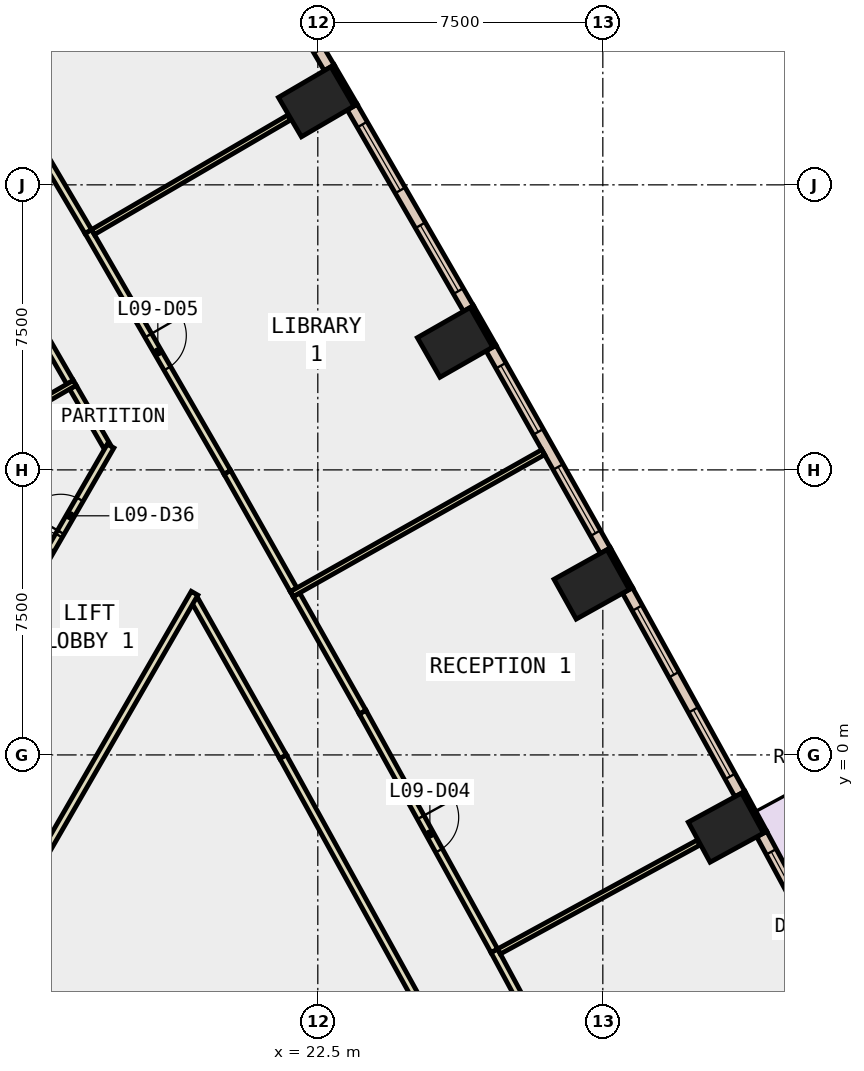
"""IFC4 building model, lengths in metres.
Left out: names, types, materials, properties, quantities, classifications, styles, units other than length and angle.
Written with IfcOpenShell. Run it as: python <this file> out.ifc"""

import sys

from ifc_helpers import new_model, si_unit, direction, frame, frame_2d, origin, origin_2d, place, context, subcontext, project, spatial, rectangle, extrude, element, fill, save


model = new_model("IFC4")
c1 = context("Model", 3, precision=1e-05, world=origin(), true_north=direction((0.0, 1.0)))
c2 = subcontext(c1, "Body", "Model", "MODEL_VIEW")
j1 = project(units=[si_unit("LENGTHUNIT", "METRE"), si_unit("PLANEANGLEUNIT", "RADIAN")], contexts=[c1])
p1 = place(None, origin())
s1 = spatial("IfcSite", under=j1, at=p1, CompositionType="ELEMENT")
p2 = place(p1, origin())
s2 = spatial("IfcBuilding", under=s1, at=p2, CompositionType="ELEMENT")
p3 = place(p2, frame((0.0, 0.0, 47.6)))
s3 = spatial("IfcBuildingStorey", under=s2, at=p3, CompositionType="ELEMENT", Elevation=47.6)
for number, where, z_axis, x_axis in (
    (1, (33.238, -1.913, -0.4), (0.0, 0.0, 1.0), (-0.478, 0.878, 0.0)),
    (2, (29.706, 4.487, -0.4), (0.0, 0.0, 1.0), (-0.487, 0.873, 0.0)),
    (3, (26.112, 10.855, -0.4), (0.0, 0.0, 1.0), (-0.496, 0.869, 0.0)),
    (4, (22.457, 17.186, -0.4), (0.0, 0.0, 1.0), (-0.504, 0.864, 0.0)),
):
    element("IfcColumn", number, at=place(p3, frame(where, z_axis=z_axis, x_axis=x_axis)), inside=s3, PredefinedType="COLUMN", context=c2, shape_type="SweptSolid", body=[
        extrude(rectangle(XDim=1.2, YDim=1.6, at=origin_2d()), origin(), (0.0, 0.0, 1.0), 4.2),
    ])
p4 = place(p3, frame((9.31, -5.375, -0.4), z_axis=(0.0, 0.0, 1.0), x_axis=(0.866017533419, -0.500013631625, 0.0)))
e5 = element("IfcWall", 5, at=p4, inside=s3, PredefinedType="SHEAR", context=c2, shape_type="SweptSolid", body=[
    extrude(rectangle(XDim=9.0, YDim=0.8, at=frame_2d((4.5, 0.0))), origin(), (0.0, 0.0, 1.0), 4.2),
])
p5 = place(p3, frame((34.271, -2.034, 0.0), z_axis=(0.0, 0.0, 1.0), x_axis=(-0.478267644701, 0.878214131082, 0.0)))
e6 = element("IfcWall", 6, at=p5, inside=s3, PredefinedType="STANDARD", context=c2, shape_type="SweptSolid", body=[
    extrude(rectangle(XDim=1.2, YDim=0.1, at=frame_2d((0.6, 0.0))), origin(), (0.0, 0.0, 1.0), 3.8),
])
p6 = place(p3, frame((30.74, 4.377, 0.0), z_axis=(0.0, 0.0, 1.0), x_axis=(-0.486730996044, 0.87355190887, 0.0)))
e7 = element("IfcWall", 7, at=p6, inside=s3, PredefinedType="STANDARD", context=c2, shape_type="SweptSolid", body=[
    extrude(rectangle(XDim=1.2, YDim=0.1, at=frame_2d((0.6, 0.0))), origin(), (0.0, 0.0, 1.0), 3.8),
])
p7 = place(p3, frame((27.148, 10.755, 0.0), z_axis=(0.0, 0.0, 1.0), x_axis=(-0.495766453659, 0.86845588456, 0.0)))
e8 = element("IfcWall", 8, at=p7, inside=s3, PredefinedType="STANDARD", context=c2, shape_type="SweptSolid", body=[
    extrude(rectangle(XDim=1.2, YDim=0.1, at=frame_2d((0.6, 0.0))), origin(), (0.0, 0.0, 1.0), 3.8),
])
p8 = place(p3, frame((23.493, 17.097, 0.0), z_axis=(0.0, 0.0, 1.0), x_axis=(-0.504225229382, 0.863572184623, 0.0)))
e9 = element("IfcWall", 9, at=p8, inside=s3, PredefinedType="STANDARD", context=c2, shape_type="SweptSolid", body=[
    extrude(rectangle(XDim=1.2, YDim=0.1, at=frame_2d((0.6, 0.0))), origin(), (0.0, 0.0, 1.0), 3.8),
])
p9 = place(p3, frame((37.086, -7.47, 0.0), z_axis=(0.0, 0.0, 1.0), x_axis=(-0.474584950749, 0.880209704856, 0.0)))
e10 = element("IfcWall", 10, at=p9, inside=s3, PredefinedType="STANDARD", context=c2, shape_type="SweptSolid", body=[
    extrude(rectangle(XDim=6.121, YDim=0.3, at=frame_2d((3.061, 0.0))), origin(), (0.0, 0.0, 1.0), 3.8),
])
p10 = place(p9, frame((0.53, 0.0, 0.0)))
e11 = element("IfcOpeningElement", 11, at=p10, cuts=e10, PredefinedType="OPENING", context=c2, shape_type="SweptSolid", body=[
    extrude(rectangle(XDim=2.0, YDim=2.4, at=frame_2d((1.0, 1.2))), frame((0.0, 0.16, 0.0), z_axis=(0.0, -1.0, 0.0), x_axis=(1.0, 0.0, 0.0)), (0.0, 0.0, 1.0), 0.32),
])
p11 = place(p9, frame((3.591, 0.0, 0.9)))
e12 = element("IfcOpeningElement", 12, at=p11, cuts=e10, PredefinedType="OPENING", context=c2, shape_type="SweptSolid", body=[
    extrude(rectangle(XDim=2.0, YDim=2.6, at=frame_2d((1.0, 1.3))), frame((0.0, 0.16, 0.0), z_axis=(0.0, -1.0, 0.0), x_axis=(1.0, 0.0, 0.0)), (0.0, 0.0, 1.0), 0.32),
])
p12 = place(p3, frame((33.607, -1.03, 0.0), z_axis=(0.0, 0.0, 1.0), x_axis=(-0.483195456594, 0.875512507465, 0.0)))
e13 = element("IfcWall", 13, at=p12, inside=s3, PredefinedType="STANDARD", context=c2, shape_type="SweptSolid", body=[
    extrude(rectangle(XDim=6.12, YDim=0.3, at=frame_2d((3.06, 0.0))), origin(), (0.0, 0.0, 1.0), 3.8),
])
p13 = place(p12, frame((0.53, 0.0, 0.9)))
e14 = element("IfcOpeningElement", 14, at=p13, cuts=e13, PredefinedType="OPENING", context=c2, shape_type="SweptSolid", body=[
    extrude(rectangle(XDim=2.0, YDim=2.6, at=frame_2d((1.0, 1.3))), frame((0.0, 0.16, 0.0), z_axis=(0.0, -1.0, 0.0), x_axis=(1.0, 0.0, 0.0)), (0.0, 0.0, 1.0), 0.32),
])
p14 = place(p12, frame((3.59, 0.0, 0.9)))
e15 = element("IfcOpeningElement", 15, at=p14, cuts=e13, PredefinedType="OPENING", context=c2, shape_type="SweptSolid", body=[
    extrude(rectangle(XDim=2.0, YDim=2.6, at=frame_2d((1.0, 1.3))), frame((0.0, 0.16, 0.0), z_axis=(0.0, -1.0, 0.0), x_axis=(1.0, 0.0, 0.0)), (0.0, 0.0, 1.0), 0.32),
])
p15 = place(p3, frame((30.067, 5.374, 0.0), z_axis=(0.0, 0.0, 1.0), x_axis=(-0.49151046248, 0.870871669807, 0.0)))
e16 = element("IfcWall", 16, at=p15, inside=s3, PredefinedType="STANDARD", context=c2, shape_type="SweptSolid", body=[
    extrude(rectangle(XDim=6.122, YDim=0.3, at=frame_2d((3.061, 0.0))), origin(), (0.0, 0.0, 1.0), 3.8),
])
p16 = place(p15, frame((0.53, 0.0, 0.9)))
e17 = element("IfcOpeningElement", 17, at=p16, cuts=e16, PredefinedType="OPENING", context=c2, shape_type="SweptSolid", body=[
    extrude(rectangle(XDim=2.0, YDim=2.6, at=frame_2d((1.0, 1.3))), frame((0.0, 0.16, 0.0), z_axis=(0.0, -1.0, 0.0), x_axis=(1.0, 0.0, 0.0)), (0.0, 0.0, 1.0), 0.32),
])
p17 = place(p15, frame((3.591, 0.0, 0.9)))
e18 = element("IfcOpeningElement", 18, at=p17, cuts=e16, PredefinedType="OPENING", context=c2, shape_type="SweptSolid", body=[
    extrude(rectangle(XDim=2.0, YDim=2.6, at=frame_2d((1.0, 1.3))), frame((0.0, 0.16, 0.0), z_axis=(0.0, -1.0, 0.0), x_axis=(1.0, 0.0, 0.0)), (0.0, 0.0, 1.0), 0.32),
])
p18 = place(p3, frame((26.464, 11.745, 0.0), z_axis=(0.0, 0.0, 1.0), x_axis=(-0.499957248001, 0.866050085256, 0.0)))
e19 = element("IfcWall", 19, at=p18, inside=s3, PredefinedType="STANDARD", context=c2, shape_type="SweptSolid", body=[
    extrude(rectangle(XDim=6.121, YDim=0.3, at=frame_2d((3.06, 0.0))), origin(), (0.0, 0.0, 1.0), 3.8),
])
p19 = place(p18, frame((0.53, 0.0, 0.9)))
e20 = element("IfcOpeningElement", 20, at=p19, cuts=e19, PredefinedType="OPENING", context=c2, shape_type="SweptSolid", body=[
    extrude(rectangle(XDim=2.0, YDim=2.6, at=frame_2d((1.0, 1.3))), frame((0.0, 0.16, 0.0), z_axis=(0.0, -1.0, 0.0), x_axis=(1.0, 0.0, 0.0)), (0.0, 0.0, 1.0), 0.32),
])
p20 = place(p18, frame((3.591, 0.0, 0.9)))
e21 = element("IfcOpeningElement", 21, at=p20, cuts=e19, PredefinedType="OPENING", context=c2, shape_type="SweptSolid", body=[
    extrude(rectangle(XDim=2.0, YDim=2.6, at=frame_2d((1.0, 1.3))), frame((0.0, 0.16, 0.0), z_axis=(0.0, -1.0, 0.0), x_axis=(1.0, 0.0, 0.0)), (0.0, 0.0, 1.0), 0.32),
])
p21 = place(p3, frame((22.8, 18.08, 0.0), z_axis=(0.0, 0.0, 1.0), x_axis=(-0.508412153373, 0.861113861404, 0.0)))
e22 = element("IfcWall", 22, at=p21, inside=s3, PredefinedType="STANDARD", context=c2, shape_type="SweptSolid", body=[
    extrude(rectangle(XDim=6.121, YDim=0.3, at=frame_2d((3.061, 0.0))), origin(), (0.0, 0.0, 1.0), 3.8),
])
p22 = place(p21, frame((0.53, 0.0, 0.9)))
e23 = element("IfcOpeningElement", 23, at=p22, cuts=e22, PredefinedType="OPENING", context=c2, shape_type="SweptSolid", body=[
    extrude(rectangle(XDim=2.0, YDim=2.6, at=frame_2d((1.0, 1.3))), frame((0.0, 0.16, 0.0), z_axis=(0.0, -1.0, 0.0), x_axis=(1.0, 0.0, 0.0)), (0.0, 0.0, 1.0), 0.32),
])
p23 = place(p21, frame((3.591, 0.0, 0.9)))
e24 = element("IfcOpeningElement", 24, at=p23, cuts=e22, PredefinedType="OPENING", context=c2, shape_type="SweptSolid", body=[
    extrude(rectangle(XDim=2.0, YDim=2.6, at=frame_2d((1.0, 1.3))), frame((0.0, 0.16, 0.0), z_axis=(0.0, -1.0, 0.0), x_axis=(1.0, 0.0, 0.0)), (0.0, 0.0, 1.0), 0.32),
])
p24 = place(p3, frame((15.98, 9.805, 0.0), z_axis=(0.0, 0.0, 1.0), x_axis=(-0.500150684419, 0.865938388614, 0.0)))
e25 = element("IfcWall", 25, at=p24, inside=s3, PredefinedType="PARTITIONING", context=c2, shape_type="SweptSolid", body=[
    extrude(rectangle(XDim=3.109, YDim=0.2, at=frame_2d((1.554, 0.0))), origin(), (0.0, 0.0, 1.0), 3.8),
])
p25 = place(p3, frame((16.948, 8.128, 0.0), z_axis=(0.0, 0.0, 1.0), x_axis=(-0.499931460552, 0.866064971437, 0.0)))
e26 = element("IfcWall", 26, at=p25, inside=s3, PredefinedType="PARTITIONING", context=c2, shape_type="SweptSolid", body=[
    extrude(rectangle(XDim=1.786, YDim=0.2, at=frame_2d((0.893, 0.0))), origin(), (0.0, 0.0, 1.0), 3.8),
])
p26 = place(p3, frame((25.074, -6.368, 0.0), z_axis=(0.0, 0.0, 1.0), x_axis=(-0.483126495407, 0.875550563609, 0.0)))
e27 = element("IfcWall", 27, at=p26, inside=s3, PredefinedType="PARTITIONING", context=c2, shape_type="SweptSolid", body=[
    extrude(rectangle(XDim=7.222, YDim=0.2, at=frame_2d((3.611, 0.0))), origin(), (0.0, 0.0, 1.0), 3.8),
])
p27 = place(p3, frame((21.585, -0.045, 0.0), z_axis=(0.0, 0.0, 1.0), x_axis=(-0.491542684896, 0.870853483042, 0.0)))
e28 = element("IfcWall", 28, at=p27, inside=s3, PredefinedType="PARTITIONING", context=c2, shape_type="SweptSolid", body=[
    extrude(rectangle(XDim=4.738, YDim=0.2, at=frame_2d((2.369, 0.0))), origin(), (0.0, 0.0, 1.0), 3.8),
])
p28 = place(p3, frame((27.145, -5.152, 0.0), z_axis=(0.0, 0.0, 1.0), x_axis=(0.474591029089, -0.880206427554, 0.0)))
e29 = element("IfcWall", 29, at=p28, inside=s3, PredefinedType="PARTITIONING", context=c2, shape_type="SweptSolid", body=[
    extrude(rectangle(XDim=7.32, YDim=0.2, at=frame_2d((3.66, 0.0))), origin(), (0.0, 0.0, 1.0), 3.8),
])
p29 = place(p28, frame((3.235, 0.0, 0.0)))
e30 = element("IfcOpeningElement", 30, at=p29, cuts=e29, PredefinedType="OPENING", context=c2, shape_type="SweptSolid", body=[
    extrude(rectangle(XDim=1.0, YDim=2.1, at=frame_2d((0.5, 1.05))), frame((0.0, 0.11, 0.0), z_axis=(0.0, -1.0, 0.0), x_axis=(1.0, 0.0, 0.0)), (0.0, 0.0, 1.0), 0.22),
])
p30 = place(p3, frame((21.937, 4.214, 0.0), z_axis=(0.0, 0.0, 1.0), x_axis=(0.491485799319, -0.870885588965, 0.0)))
e31 = element("IfcWall", 31, at=p30, inside=s3, PredefinedType="PARTITIONING", context=c2, shape_type="SweptSolid", body=[
    extrude(rectangle(XDim=3.548, YDim=0.2, at=frame_2d((1.774, 0.0))), origin(), (0.0, 0.0, 1.0), 3.8),
])
p31 = place(p3, frame((23.681, 1.124, 0.0), z_axis=(0.0, 0.0, 1.0), x_axis=(0.483125061868, -0.875551354631, 0.0)))
e32 = element("IfcWall", 32, at=p31, inside=s3, PredefinedType="PARTITIONING", context=c2, shape_type="SweptSolid", body=[
    extrude(rectangle(XDim=7.168, YDim=0.2, at=frame_2d((3.584, 0.0))), origin(), (0.0, 0.0, 1.0), 3.8),
])
p32 = place(p31, frame((3.159, 0.0, 0.0)))
e33 = element("IfcOpeningElement", 33, at=p32, cuts=e32, PredefinedType="OPENING", context=c2, shape_type="SweptSolid", body=[
    extrude(rectangle(XDim=1.0, YDim=2.1, at=frame_2d((0.5, 1.05))), frame((0.0, 0.11, 0.0), z_axis=(0.0, -1.0, 0.0), x_axis=(1.0, 0.0, 0.0)), (0.0, 0.0, 1.0), 0.22),
])
p33 = place(p3, frame((16.46, 13.772, 0.0), z_axis=(0.0, 0.0, 1.0), x_axis=(0.500099745063, -0.865967808286, 0.0)))
e34 = element("IfcWall", 34, at=p33, inside=s3, PredefinedType="PARTITIONING", context=c2, shape_type="SweptSolid", body=[
    extrude(rectangle(XDim=7.319, YDim=0.2, at=frame_2d((3.659, 0.0))), origin(), (0.0, 0.0, 1.0), 3.8),
])
p34 = place(p33, frame((3.159, 0.0, 0.0)))
e35 = element("IfcOpeningElement", 35, at=p34, cuts=e34, PredefinedType="OPENING", context=c2, shape_type="SweptSolid", body=[
    extrude(rectangle(XDim=1.0, YDim=2.1, at=frame_2d((0.5, 1.05))), frame((0.0, 0.11, 0.0), z_axis=(0.0, -1.0, 0.0), x_axis=(1.0, 0.0, 0.0)), (0.0, 0.0, 1.0), 0.22),
])
p35 = place(p3, frame((20.12, 7.434, 0.0), z_axis=(0.0, 0.0, 1.0), x_axis=(0.491394823876, -0.87093692485, 0.0)))
e36 = element("IfcWall", 36, at=p35, inside=s3, PredefinedType="PARTITIONING", context=c2, shape_type="SweptSolid", body=[
    extrude(rectangle(XDim=3.547, YDim=0.2, at=frame_2d((1.773, 0.0))), origin(), (0.0, 0.0, 1.0), 3.8),
])
p36 = place(p3, frame((12.815, 19.946, 0.0), z_axis=(0.0, 0.0, 1.0), x_axis=(0.508287536166, -0.861187424768, 0.0)))
e37 = element("IfcWall", 37, at=p36, inside=s3, PredefinedType="PARTITIONING", context=c2, shape_type="SweptSolid", body=[
    extrude(rectangle(XDim=7.169, YDim=0.2, at=frame_2d((3.584, 0.0))), origin(), (0.0, 0.0, 1.0), 3.8),
])
p37 = place(p3, frame((16.104, 9.79, 0.0), z_axis=(0.0, 0.0, 1.0), x_axis=(-0.866023462144, -0.500003363005, 0.0)))
e38 = element("IfcWall", 38, at=p37, inside=s3, PredefinedType="PARTITIONING", context=c2, shape_type="SweptSolid", body=[
    extrude(rectangle(XDim=5.592, YDim=0.15, at=frame_2d((2.796, 0.0))), origin(), (0.0, 0.0, 1.0), 3.8),
])
p38 = place(p3, frame((13.827, 2.55, 0.0), z_axis=(0.0, 0.0, 1.0), x_axis=(0.500093193185, 0.865971591988, 0.0)))
e39 = element("IfcWall", 39, at=p38, inside=s3, PredefinedType="PARTITIONING", context=c2, shape_type="SweptSolid", body=[
    extrude(rectangle(XDim=6.441, YDim=0.2, at=frame_2d((3.221, 0.0))), origin(), (0.0, 0.0, 1.0), 3.8),
])
p39 = place(p38, frame((2.721, 0.0, 0.0)))
e40 = element("IfcOpeningElement", 40, at=p39, cuts=e39, PredefinedType="OPENING", context=c2, shape_type="SweptSolid", body=[
    extrude(rectangle(XDim=1.0, YDim=2.1, at=frame_2d((0.5, 1.05))), frame((0.0, 0.11, 0.0), z_axis=(0.0, -1.0, 0.0), x_axis=(1.0, 0.0, 0.0)), (0.0, 0.0, 1.0), 0.22),
])
p40 = place(p38, frame((3.821, 0.0, 0.0)))
e41 = element("IfcOpeningElement", 41, at=p40, cuts=e39, PredefinedType="OPENING", context=c2, shape_type="SweptSolid", body=[
    extrude(rectangle(XDim=1.0, YDim=2.1, at=frame_2d((0.5, 1.05))), frame((0.0, 0.11, 0.0), z_axis=(0.0, -1.0, 0.0), x_axis=(1.0, 0.0, 0.0)), (0.0, 0.0, 1.0), 0.22),
])
p41 = place(p3, frame((19.257, 4.255, 0.0), z_axis=(0.0, 0.0, 1.0), x_axis=(-0.499978317034, -0.866037922089, 0.0)))
e42 = element("IfcWall", 42, at=p41, inside=s3, PredefinedType="PARTITIONING", context=c2, shape_type="SweptSolid", body=[
    extrude(rectangle(XDim=12.913, YDim=0.2, at=frame_2d((6.456, 0.0))), origin(), (0.0, 0.0, 1.0), 3.8),
])
p42 = place(p3, frame((27.268, -5.171, 0.0), z_axis=(0.0, 0.0, 1.0), x_axis=(0.877837854343, 0.478957932895, 0.0)))
e43 = element("IfcWall", 43, at=p42, inside=s3, PredefinedType="PARTITIONING", context=c2, shape_type="SweptSolid", body=[
    extrude(rectangle(XDim=5.982, YDim=0.15, at=frame_2d((2.991, 0.0))), origin(), (0.0, 0.0, 1.0), 3.8),
])
p43 = place(p3, frame((21.813, 4.231, 0.0), z_axis=(0.0, 0.0, 1.0), x_axis=(0.870901264369, 0.491458022337, 0.0)))
e44 = element("IfcWall", 44, at=p43, inside=s3, PredefinedType="PARTITIONING", context=c2, shape_type="SweptSolid", body=[
    extrude(rectangle(XDim=7.6, YDim=0.15, at=frame_2d((3.8, 0.0))), origin(), (0.0, 0.0, 1.0), 3.8),
])
p44 = place(p3, frame((16.584, 13.757, 0.0), z_axis=(0.0, 0.0, 1.0), x_axis=(0.863565634474, 0.504236447469, 0.0)))
e45 = element("IfcWall", 45, at=p44, inside=s3, PredefinedType="PARTITIONING", context=c2, shape_type="SweptSolid", body=[
    extrude(rectangle(XDim=5.981, YDim=0.15, at=frame_2d((2.99, 0.0))), origin(), (0.0, 0.0, 1.0), 3.8),
])
p45 = place(p11, origin())
e46 = element("IfcWindow", 46, at=p45, inside=s3, PartitioningType="SINGLE_PANEL", PredefinedType="WINDOW", context=c2, shape_type="SweptSolid", body=[
    extrude(rectangle(XDim=2.0, YDim=2.6, at=frame_2d((1.0, 1.3))), frame((0.0, 0.03, 0.0), z_axis=(0.0, -1.0, 0.0), x_axis=(1.0, 0.0, 0.0)), (0.0, 0.0, 1.0), 0.06),
])
fill(e12, e46)
p46 = place(p13, origin())
e47 = element("IfcWindow", 47, at=p46, inside=s3, PartitioningType="SINGLE_PANEL", PredefinedType="WINDOW", context=c2, shape_type="SweptSolid", body=[
    extrude(rectangle(XDim=2.0, YDim=2.6, at=frame_2d((1.0, 1.3))), frame((0.0, 0.03, 0.0), z_axis=(0.0, -1.0, 0.0), x_axis=(1.0, 0.0, 0.0)), (0.0, 0.0, 1.0), 0.06),
])
fill(e14, e47)
p47 = place(p14, origin())
e48 = element("IfcWindow", 48, at=p47, inside=s3, PartitioningType="SINGLE_PANEL", PredefinedType="WINDOW", context=c2, shape_type="SweptSolid", body=[
    extrude(rectangle(XDim=2.0, YDim=2.6, at=frame_2d((1.0, 1.3))), frame((0.0, 0.03, 0.0), z_axis=(0.0, -1.0, 0.0), x_axis=(1.0, 0.0, 0.0)), (0.0, 0.0, 1.0), 0.06),
])
fill(e15, e48)
p48 = place(p16, origin())
e49 = element("IfcWindow", 49, at=p48, inside=s3, PartitioningType="SINGLE_PANEL", PredefinedType="WINDOW", context=c2, shape_type="SweptSolid", body=[
    extrude(rectangle(XDim=2.0, YDim=2.6, at=frame_2d((1.0, 1.3))), frame((0.0, 0.03, 0.0), z_axis=(0.0, -1.0, 0.0), x_axis=(1.0, 0.0, 0.0)), (0.0, 0.0, 1.0), 0.06),
])
fill(e17, e49)
p49 = place(p17, origin())
e50 = element("IfcWindow", 50, at=p49, inside=s3, PartitioningType="SINGLE_PANEL", PredefinedType="WINDOW", context=c2, shape_type="SweptSolid", body=[
    extrude(rectangle(XDim=2.0, YDim=2.6, at=frame_2d((1.0, 1.3))), frame((0.0, 0.03, 0.0), z_axis=(0.0, -1.0, 0.0), x_axis=(1.0, 0.0, 0.0)), (0.0, 0.0, 1.0), 0.06),
])
fill(e18, e50)
p50 = place(p19, origin())
e51 = element("IfcWindow", 51, at=p50, inside=s3, PartitioningType="SINGLE_PANEL", PredefinedType="WINDOW", context=c2, shape_type="SweptSolid", body=[
    extrude(rectangle(XDim=2.0, YDim=2.6, at=frame_2d((1.0, 1.3))), frame((0.0, 0.03, 0.0), z_axis=(0.0, -1.0, 0.0), x_axis=(1.0, 0.0, 0.0)), (0.0, 0.0, 1.0), 0.06),
])
fill(e20, e51)
p51 = place(p20, origin())
e52 = element("IfcWindow", 52, at=p51, inside=s3, PartitioningType="SINGLE_PANEL", PredefinedType="WINDOW", context=c2, shape_type="SweptSolid", body=[
    extrude(rectangle(XDim=2.0, YDim=2.6, at=frame_2d((1.0, 1.3))), frame((0.0, 0.03, 0.0), z_axis=(0.0, -1.0, 0.0), x_axis=(1.0, 0.0, 0.0)), (0.0, 0.0, 1.0), 0.06),
])
fill(e21, e52)
p52 = place(p32, origin())
e53 = element("IfcDoor", 53, at=p52, inside=s3, OperationType="SINGLE_SWING_LEFT", PredefinedType="DOOR", context=c2, shape_type="SweptSolid", body=[
    extrude(rectangle(XDim=1.0, YDim=2.1, at=frame_2d((0.5, 1.05))), frame((0.0, 0.025, 0.0), z_axis=(0.0, -1.0, 0.0), x_axis=(1.0, 0.0, 0.0)), (0.0, 0.0, 1.0), 0.05),
])
fill(e33, e53)
p53 = place(p34, origin())
e54 = element("IfcDoor", 54, at=p53, inside=s3, OperationType="SINGLE_SWING_LEFT", PredefinedType="DOOR", context=c2, shape_type="SweptSolid", body=[
    extrude(rectangle(XDim=1.0, YDim=2.1, at=frame_2d((0.5, 1.05))), frame((0.0, 0.025, 0.0), z_axis=(0.0, -1.0, 0.0), x_axis=(1.0, 0.0, 0.0)), (0.0, 0.0, 1.0), 0.05),
])
fill(e35, e54)
p54 = place(p39, origin())
e55 = element("IfcDoor", 55, at=p54, inside=s3, OperationType="SINGLE_SWING_LEFT", PredefinedType="DOOR", context=c2, shape_type="SweptSolid", body=[
    extrude(rectangle(XDim=1.0, YDim=2.1, at=frame_2d((0.5, 1.05))), frame((0.0, 0.025, 0.0), z_axis=(0.0, -1.0, 0.0), x_axis=(1.0, 0.0, 0.0)), (0.0, 0.0, 1.0), 0.05),
])
fill(e40, e55)
p55 = place(p40, origin())
e56 = element("IfcDoor", 56, at=p55, inside=s3, OperationType="SINGLE_SWING_RIGHT", PredefinedType="DOOR", context=c2, shape_type="SweptSolid", body=[
    extrude(rectangle(XDim=1.0, YDim=2.1, at=frame_2d((0.5, 1.05))), frame((0.0, 0.025, 0.0), z_axis=(0.0, -1.0, 0.0), x_axis=(1.0, 0.0, 0.0)), (0.0, 0.0, 1.0), 0.05),
])
fill(e41, e56)
save(model, sys.argv[1])
